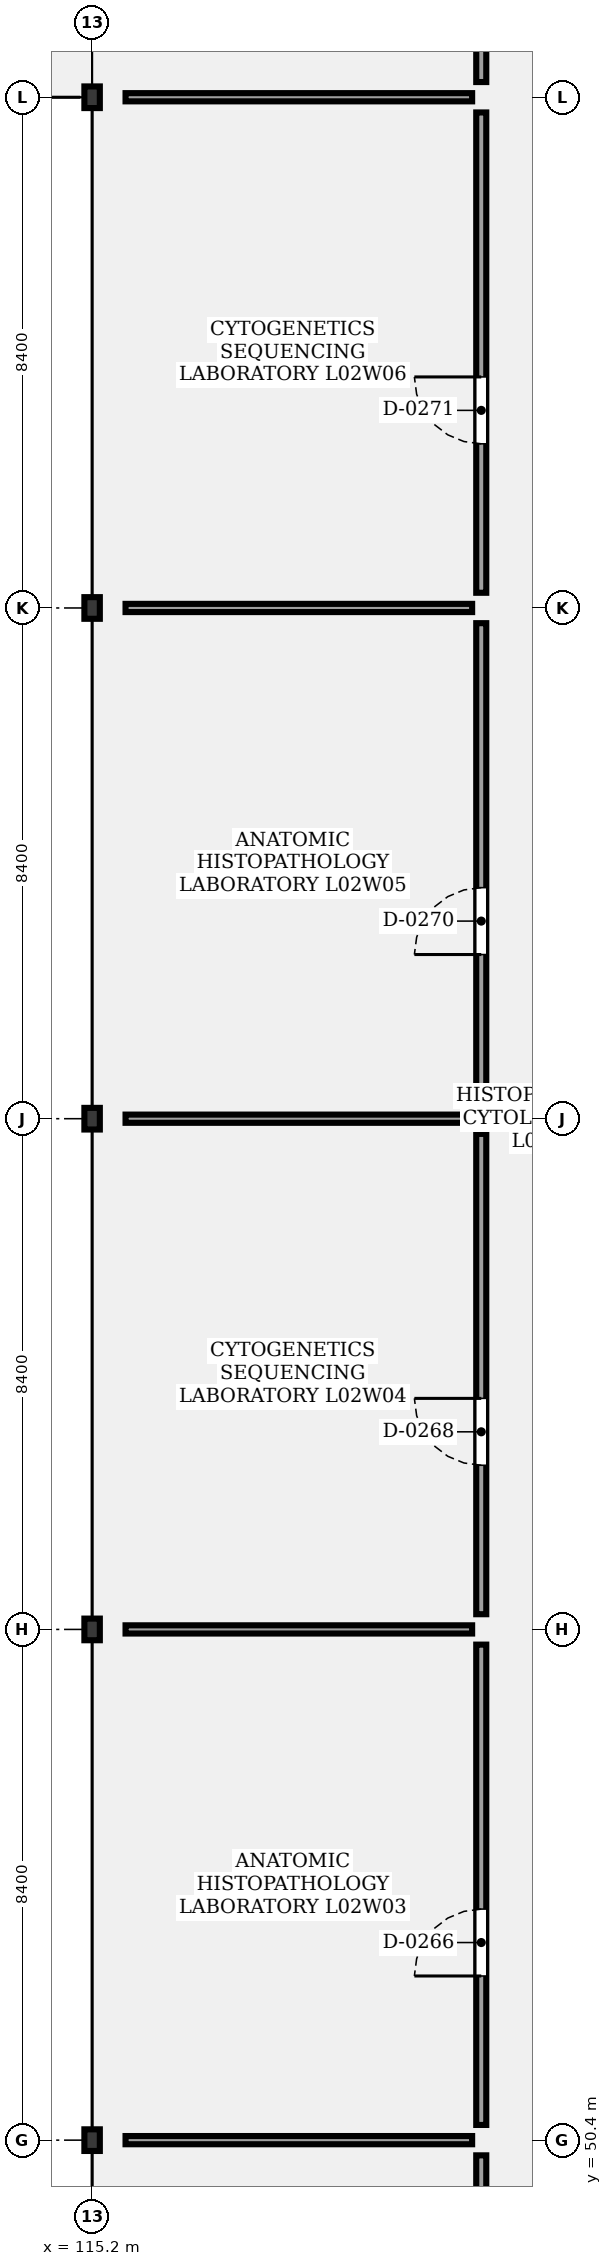
"""IFC4 building model, lengths in metres.
Left out: names, types, materials, properties, quantities, classifications, styles, units other than length and angle.
Written with IfcOpenShell. Run it as: python <this file> out.ifc"""

import sys

from ifc_helpers import new_model, si_unit, direction, frame, frame_2d, origin, origin_2d, place, context, subcontext, project, spatial, rectangle, i_section, extrude, element, fill, save


model = new_model("IFC4")
c1 = context("Model", 3, precision=1e-05, world=origin(), true_north=direction((0.0, 1.0)))
c2 = subcontext(c1, "Body", "Model", "MODEL_VIEW")
j1 = project(units=[si_unit("LENGTHUNIT", "METRE"), si_unit("PLANEANGLEUNIT", "RADIAN")], contexts=[c1])
p1 = place(None, origin())
s1 = spatial("IfcSite", under=j1, at=p1, CompositionType="ELEMENT")
p2 = place(p1, origin())
s2 = spatial("IfcBuilding", under=s1, at=p2, CompositionType="ELEMENT")
p3 = place(p2, frame((0.0, 0.0, 9.9)))
s3 = spatial("IfcBuildingStorey", under=s2, at=p3, CompositionType="ELEMENT", Elevation=9.9)
for number, where, z_axis, x_axis in (
    (1, (115.2, 50.4, 0.0), (0.0, 0.0, 1.0), (0.0, -1.0, 0.0)),
    (2, (115.2, 58.8, 0.0), (0.0, 0.0, 1.0), (0.0, -1.0, 0.0)),
    (3, (115.2, 67.2, 0.0), (0.0, 0.0, 1.0), (0.0, -1.0, 0.0)),
    (4, (115.2, 75.6, 0.0), (0.0, 0.0, 1.0), (0.0, -1.0, 0.0)),
    (5, (115.2, 84.0, 0.0), (0.0, 0.0, 1.0), (0.0, -1.0, 0.0)),
):
    element("IfcColumn", number, at=place(p3, frame(where, z_axis=z_axis, x_axis=x_axis)), inside=s3, PredefinedType="COLUMN", context=c2, shape_type="SweptSolid", body=[
        extrude(i_section(OverallWidth=0.254, OverallDepth=0.356, WebThickness=0.011, FlangeThickness=0.018, at=origin_2d()), origin(), (0.0, 0.0, 1.0), 3.6),
    ])
p4 = place(p3, frame((121.6, 42.25, 0.0), z_axis=(0.0, 0.0, 1.0), x_axis=(0.0, 1.0, 0.0)))
e6 = element("IfcWall", 6, at=p4, inside=s3, PredefinedType="PARTITIONING", context=c2, shape_type="SweptSolid", body=[
    extrude(rectangle(XDim=7.9, YDim=0.165, at=frame_2d((3.95, 0.0))), origin(), (0.0, 0.0, 1.0), 2.48),
])
p5 = place(p4, frame((2.45, 0.0, 0.0)))
e7 = element("IfcOpeningElement", 7, at=p5, cuts=e6, PredefinedType="OPENING", context=c2, shape_type="SweptSolid", body=[
    extrude(rectangle(XDim=1.1, YDim=2.4, at=frame_2d((0.55, 1.2))), frame((0.0, 0.093, 0.0), z_axis=(0.0, -1.0, 0.0), x_axis=(1.0, 0.0, 0.0)), (0.0, 0.0, 1.0), 0.185),
])
p6 = place(p3, frame((121.6, 50.65, 0.0), z_axis=(0.0, 0.0, 1.0), x_axis=(0.0, 1.0, 0.0)))
e8 = element("IfcWall", 8, at=p6, inside=s3, PredefinedType="PARTITIONING", context=c2, shape_type="SweptSolid", body=[
    extrude(rectangle(XDim=7.9, YDim=0.165, at=frame_2d((3.95, 0.0))), origin(), (0.0, 0.0, 1.0), 2.48),
])
p7 = place(p6, frame((2.45, 0.0, 0.0)))
e9 = element("IfcOpeningElement", 9, at=p7, cuts=e8, PredefinedType="OPENING", context=c2, shape_type="SweptSolid", body=[
    extrude(rectangle(XDim=1.1, YDim=2.4, at=frame_2d((0.55, 1.2))), frame((0.0, 0.093, 0.0), z_axis=(0.0, -1.0, 0.0), x_axis=(1.0, 0.0, 0.0)), (0.0, 0.0, 1.0), 0.185),
])
p8 = place(p3, frame((115.75, 50.4, 0.0), z_axis=(0.0, 0.0, 1.0), x_axis=(1.0, 0.0, 0.0)))
e10 = element("IfcWall", 10, at=p8, inside=s3, PredefinedType="PARTITIONING", context=c2, shape_type="SweptSolid", body=[
    extrude(rectangle(XDim=5.7, YDim=0.135, at=frame_2d((2.85, 0.0))), origin(), (0.0, 0.0, 1.0), 2.48),
])
p9 = place(p3, frame((121.6, 59.05, 0.0), z_axis=(0.0, 0.0, 1.0), x_axis=(0.0, 1.0, 0.0)))
e11 = element("IfcWall", 11, at=p9, inside=s3, PredefinedType="PARTITIONING", context=c2, shape_type="SweptSolid", body=[
    extrude(rectangle(XDim=7.9, YDim=0.165, at=frame_2d((3.95, 0.0))), origin(), (0.0, 0.0, 1.0), 2.48),
])
p10 = place(p9, frame((2.45, 0.0, 0.0)))
e12 = element("IfcOpeningElement", 12, at=p10, cuts=e11, PredefinedType="OPENING", context=c2, shape_type="SweptSolid", body=[
    extrude(rectangle(XDim=1.1, YDim=2.4, at=frame_2d((0.55, 1.2))), frame((0.0, 0.093, 0.0), z_axis=(0.0, -1.0, 0.0), x_axis=(1.0, 0.0, 0.0)), (0.0, 0.0, 1.0), 0.185),
])
p11 = place(p3, frame((115.75, 58.8, 0.0), z_axis=(0.0, 0.0, 1.0), x_axis=(1.0, 0.0, 0.0)))
e13 = element("IfcWall", 13, at=p11, inside=s3, PredefinedType="PARTITIONING", context=c2, shape_type="SweptSolid", body=[
    extrude(rectangle(XDim=5.7, YDim=0.135, at=frame_2d((2.85, 0.0))), origin(), (0.0, 0.0, 1.0), 2.48),
])
p12 = place(p3, frame((121.6, 67.45, 0.0), z_axis=(0.0, 0.0, 1.0), x_axis=(0.0, 1.0, 0.0)))
e14 = element("IfcWall", 14, at=p12, inside=s3, PredefinedType="PARTITIONING", context=c2, shape_type="SweptSolid", body=[
    extrude(rectangle(XDim=7.9, YDim=0.165, at=frame_2d((3.95, 0.0))), origin(), (0.0, 0.0, 1.0), 2.48),
])
p13 = place(p12, frame((2.45, 0.0, 0.0)))
e15 = element("IfcOpeningElement", 15, at=p13, cuts=e14, PredefinedType="OPENING", context=c2, shape_type="SweptSolid", body=[
    extrude(rectangle(XDim=1.1, YDim=2.4, at=frame_2d((0.55, 1.2))), frame((0.0, 0.093, 0.0), z_axis=(0.0, -1.0, 0.0), x_axis=(1.0, 0.0, 0.0)), (0.0, 0.0, 1.0), 0.185),
])
p14 = place(p3, frame((115.75, 67.2, 0.0), z_axis=(0.0, 0.0, 1.0), x_axis=(1.0, 0.0, 0.0)))
e16 = element("IfcWall", 16, at=p14, inside=s3, PredefinedType="PARTITIONING", context=c2, shape_type="SweptSolid", body=[
    extrude(rectangle(XDim=5.7, YDim=0.135, at=frame_2d((2.85, 0.0))), origin(), (0.0, 0.0, 1.0), 2.48),
])
p15 = place(p3, frame((121.6, 75.85, 0.0), z_axis=(0.0, 0.0, 1.0), x_axis=(0.0, 1.0, 0.0)))
e17 = element("IfcWall", 17, at=p15, inside=s3, PredefinedType="PARTITIONING", context=c2, shape_type="SweptSolid", body=[
    extrude(rectangle(XDim=7.9, YDim=0.165, at=frame_2d((3.95, 0.0))), origin(), (0.0, 0.0, 1.0), 2.48),
])
p16 = place(p15, frame((2.45, 0.0, 0.0)))
e18 = element("IfcOpeningElement", 18, at=p16, cuts=e17, PredefinedType="OPENING", context=c2, shape_type="SweptSolid", body=[
    extrude(rectangle(XDim=1.1, YDim=2.4, at=frame_2d((0.55, 1.2))), frame((0.0, 0.093, 0.0), z_axis=(0.0, -1.0, 0.0), x_axis=(1.0, 0.0, 0.0)), (0.0, 0.0, 1.0), 0.185),
])
p17 = place(p3, frame((115.75, 75.6, 0.0), z_axis=(0.0, 0.0, 1.0), x_axis=(1.0, 0.0, 0.0)))
e19 = element("IfcWall", 19, at=p17, inside=s3, PredefinedType="PARTITIONING", context=c2, shape_type="SweptSolid", body=[
    extrude(rectangle(XDim=5.7, YDim=0.135, at=frame_2d((2.85, 0.0))), origin(), (0.0, 0.0, 1.0), 2.48),
])
p18 = place(p3, frame((121.6, 84.25, 0.0), z_axis=(0.0, 0.0, 1.0), x_axis=(0.0, 1.0, 0.0)))
e20 = element("IfcWall", 20, at=p18, inside=s3, PredefinedType="PARTITIONING", context=c2, shape_type="SweptSolid", body=[
    extrude(rectangle(XDim=7.9, YDim=0.165, at=frame_2d((3.95, 0.0))), origin(), (0.0, 0.0, 1.0), 2.48),
])
p19 = place(p18, frame((2.45, 0.0, 0.0)))
e21 = element("IfcOpeningElement", 21, at=p19, cuts=e20, PredefinedType="OPENING", context=c2, shape_type="SweptSolid", body=[
    extrude(rectangle(XDim=1.1, YDim=2.4, at=frame_2d((0.55, 1.2))), frame((0.0, 0.093, 0.0), z_axis=(0.0, -1.0, 0.0), x_axis=(1.0, 0.0, 0.0)), (0.0, 0.0, 1.0), 0.185),
])
p20 = place(p3, frame((115.75, 84.0, 0.0), z_axis=(0.0, 0.0, 1.0), x_axis=(1.0, 0.0, 0.0)))
e22 = element("IfcWall", 22, at=p20, inside=s3, PredefinedType="PARTITIONING", context=c2, shape_type="SweptSolid", body=[
    extrude(rectangle(XDim=5.7, YDim=0.135, at=frame_2d((2.85, 0.0))), origin(), (0.0, 0.0, 1.0), 2.48),
])
p21 = place(p7, origin())
e23 = element("IfcDoor", 23, at=p21, inside=s3, OperationType="SINGLE_SWING_LEFT", PredefinedType="DOOR", context=c2, shape_type="SweptSolid", body=[
    extrude(rectangle(XDim=1.1, YDim=2.4, at=frame_2d((0.55, 1.2))), frame((0.0, 0.025, 0.0), z_axis=(0.0, -1.0, 0.0), x_axis=(1.0, 0.0, 0.0)), (0.0, 0.0, 1.0), 0.05),
])
fill(e9, e23)
p22 = place(p10, origin())
e24 = element("IfcDoor", 24, at=p22, inside=s3, OperationType="SINGLE_SWING_RIGHT", PredefinedType="DOOR", context=c2, shape_type="SweptSolid", body=[
    extrude(rectangle(XDim=1.1, YDim=2.4, at=frame_2d((0.55, 1.2))), frame((0.0, 0.025, 0.0), z_axis=(0.0, -1.0, 0.0), x_axis=(1.0, 0.0, 0.0)), (0.0, 0.0, 1.0), 0.05),
])
fill(e12, e24)
p23 = place(p13, origin())
e25 = element("IfcDoor", 25, at=p23, inside=s3, OperationType="SINGLE_SWING_LEFT", PredefinedType="DOOR", context=c2, shape_type="SweptSolid", body=[
    extrude(rectangle(XDim=1.1, YDim=2.4, at=frame_2d((0.55, 1.2))), frame((0.0, 0.025, 0.0), z_axis=(0.0, -1.0, 0.0), x_axis=(1.0, 0.0, 0.0)), (0.0, 0.0, 1.0), 0.05),
])
fill(e15, e25)
p24 = place(p16, origin())
e26 = element("IfcDoor", 26, at=p24, inside=s3, OperationType="SINGLE_SWING_RIGHT", PredefinedType="DOOR", context=c2, shape_type="SweptSolid", body=[
    extrude(rectangle(XDim=1.1, YDim=2.4, at=frame_2d((0.55, 1.2))), frame((0.0, 0.025, 0.0), z_axis=(0.0, -1.0, 0.0), x_axis=(1.0, 0.0, 0.0)), (0.0, 0.0, 1.0), 0.05),
])
fill(e18, e26)
save(model, sys.argv[1])
